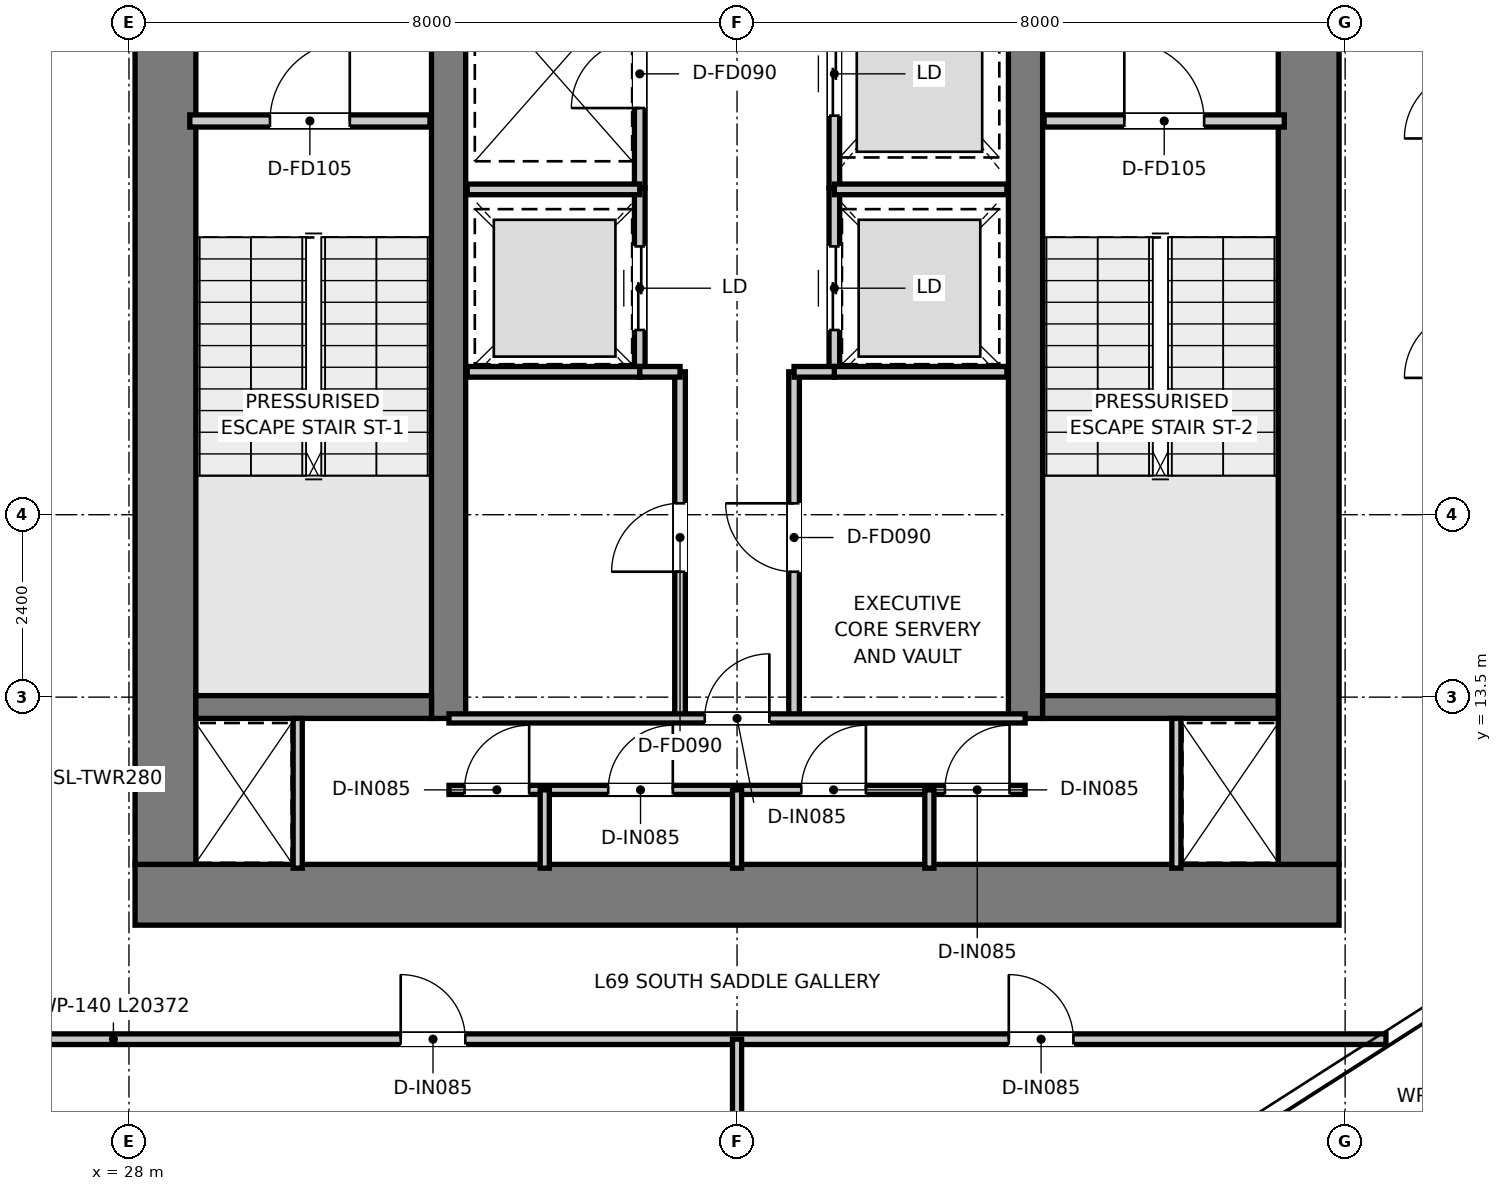
"""IFC4 building model, lengths in metres.
Left out: names, types, materials, properties, quantities, classifications, styles, units other than length and angle.
Written with IfcOpenShell. Run it as: python <this file> out.ifc"""

import sys

from ifc_helpers import new_model, si_unit, direction, frame, frame_2d, origin, place, context, subcontext, project, spatial, rectangle, extrude, element, fill, save


model = new_model("IFC4")
c1 = context("Model", 3, precision=1e-05, world=origin(), true_north=direction((0.0, 1.0)))
c2 = subcontext(c1, "Body", "Model", "MODEL_VIEW")
j1 = project(units=[si_unit("LENGTHUNIT", "METRE"), si_unit("PLANEANGLEUNIT", "RADIAN")], contexts=[c1])
p1 = place(None, origin())
s1 = spatial("IfcSite", under=j1, at=p1, CompositionType="ELEMENT")
p2 = place(p1, origin())
s2 = spatial("IfcBuilding", under=s1, at=p2, CompositionType="ELEMENT")
p3 = place(p2, frame((0.0, 0.0, 283.2)))
s3 = spatial("IfcBuildingStorey", under=s2, at=p3, CompositionType="ELEMENT", Elevation=283.2)
p4 = place(p3, frame((28.08, 10.9, 0.0), z_axis=(0.0, 0.0, 1.0), x_axis=(1.0, 0.0, 0.0)))
e1 = element("IfcWall", 1, at=p4, inside=s3, PredefinedType="SHEAR", context=c2, shape_type="SweptSolid", body=[
    extrude(rectangle(XDim=15.84, YDim=0.8, at=frame_2d((7.92, 0.0))), origin(), (0.0, 0.0, 1.0), 3.95),
])
for number, where, z_axis, x_axis in (
    (2, (28.48, 11.3, 0.0), (0.0, 0.0, 1.0), (0.0, 1.0, 0.0)),
    (3, (43.52, 11.3, 0.0), (0.0, 0.0, 1.0), (0.0, 1.0, 0.0)),
):
    element("IfcWall", number, at=place(p3, frame(where, z_axis=z_axis, x_axis=x_axis)), inside=s3, PredefinedType="SHEAR", context=c2, shape_type="SweptSolid", body=[
        extrude(rectangle(XDim=14.7, YDim=0.8, at=frame_2d((7.35, 0.0))), origin(), (0.0, 0.0, 1.0), 3.95),
    ])
p5 = place(p3, frame((32.205, 13.22, 0.0), z_axis=(0.0, 0.0, 1.0), x_axis=(0.0, 1.0, 0.0)))
e4 = element("IfcWall", 4, at=p5, inside=s3, PredefinedType="SHEAR", context=c2, shape_type="SweptSolid", body=[
    extrude(rectangle(XDim=12.78, YDim=0.45, at=frame_2d((6.39, 0.0))), origin(), (0.0, 0.0, 1.0), 3.95),
])
p6 = place(p5, frame((10.58, 0.0, 0.0)))
e5 = element("IfcOpeningElement", 5, at=p6, cuts=e4, PredefinedType="OPENING", context=c2, shape_type="SweptSolid", body=[
    extrude(rectangle(XDim=1.1, YDim=2.15, at=frame_2d((0.55, 1.075))), frame((0.0, 0.235, 0.0), z_axis=(0.0, -1.0, 0.0), x_axis=(1.0, 0.0, 0.0)), (0.0, 0.0, 1.0), 0.47),
])
p7 = place(p3, frame((39.795, 13.22, 0.0), z_axis=(0.0, 0.0, 1.0), x_axis=(0.0, 1.0, 0.0)))
e6 = element("IfcWall", 6, at=p7, inside=s3, PredefinedType="SHEAR", context=c2, shape_type="SweptSolid", body=[
    extrude(rectangle(XDim=12.78, YDim=0.45, at=frame_2d((6.39, 0.0))), origin(), (0.0, 0.0, 1.0), 3.95),
])
p8 = place(p7, frame((10.58, 0.0, 0.0)))
e7 = element("IfcOpeningElement", 7, at=p8, cuts=e6, PredefinedType="OPENING", context=c2, shape_type="SweptSolid", body=[
    extrude(rectangle(XDim=1.1, YDim=2.15, at=frame_2d((0.55, 1.075))), frame((0.0, 0.235, 0.0), z_axis=(0.0, -1.0, 0.0), x_axis=(1.0, 0.0, 0.0)), (0.0, 0.0, 1.0), 0.47),
])
for number, where, z_axis, x_axis in (
    (8, (28.88, 13.37, 0.0), (0.0, 0.0, 1.0), (1.0, 0.0, 0.0)),
    (9, (40.02, 13.37, 0.0), (0.0, 0.0, 1.0), (1.0, 0.0, 0.0)),
):
    element("IfcWall", number, at=place(p3, frame(where, z_axis=z_axis, x_axis=x_axis)), inside=s3, PredefinedType="SHEAR", context=c2, shape_type="SweptSolid", body=[
        extrude(rectangle(XDim=3.1, YDim=0.3, at=frame_2d((1.55, 0.0))), origin(), (0.0, 0.0, 1.0), 3.95),
    ])
p9 = place(p3, frame((28.8, 21.08, 0.0), z_axis=(0.0, 0.0, 1.0), x_axis=(1.0, 0.0, 0.0)))
e10 = element("IfcWall", 10, at=p9, inside=s3, PredefinedType="PARTITIONING", context=c2, shape_type="SweptSolid", body=[
    extrude(rectangle(XDim=3.16, YDim=0.16, at=frame_2d((1.58, 0.0))), origin(), (0.0, 0.0, 1.0), 3.67),
])
p10 = place(p9, frame((1.055, 0.0, 0.0)))
e11 = element("IfcOpeningElement", 11, at=p10, cuts=e10, PredefinedType="OPENING", context=c2, shape_type="SweptSolid", body=[
    extrude(rectangle(XDim=1.05, YDim=2.1, at=frame_2d((0.525, 1.05))), frame((0.0, 0.09, 0.0), z_axis=(0.0, -1.0, 0.0), x_axis=(1.0, 0.0, 0.0)), (0.0, 0.0, 1.0), 0.18),
])
p11 = place(p3, frame((40.04, 21.08, 0.0), z_axis=(0.0, 0.0, 1.0), x_axis=(1.0, 0.0, 0.0)))
e12 = element("IfcWall", 12, at=p11, inside=s3, PredefinedType="PARTITIONING", context=c2, shape_type="SweptSolid", body=[
    extrude(rectangle(XDim=3.16, YDim=0.16, at=frame_2d((1.58, 0.0))), origin(), (0.0, 0.0, 1.0), 3.67),
])
p12 = place(p11, frame((1.055, 0.0, 0.0)))
e13 = element("IfcOpeningElement", 13, at=p12, cuts=e12, PredefinedType="OPENING", context=c2, shape_type="SweptSolid", body=[
    extrude(rectangle(XDim=1.05, YDim=2.1, at=frame_2d((0.525, 1.05))), frame((0.0, 0.09, 0.0), z_axis=(0.0, -1.0, 0.0), x_axis=(1.0, 0.0, 0.0)), (0.0, 0.0, 1.0), 0.18),
])
p13 = place(p3, frame((34.72, 20.2, 0.0), z_axis=(0.0, 0.0, 1.0), x_axis=(0.0, 1.0, 0.0)))
e14 = element("IfcWall", 14, at=p13, inside=s3, PredefinedType="PARTITIONING", context=c2, shape_type="SweptSolid", body=[
    extrude(rectangle(XDim=5.78, YDim=0.14, at=frame_2d((2.89, 0.0))), origin(), (0.0, 0.0, 1.0), 2.82),
])
p14 = place(p13, frame((1.05, 0.0, 0.0)))
e15 = element("IfcOpeningElement", 15, at=p14, cuts=e14, PredefinedType="OPENING", context=c2, shape_type="SweptSolid", body=[
    extrude(rectangle(XDim=0.9, YDim=2.1, at=frame_2d((0.45, 1.05))), frame((0.0, 0.08, 0.0), z_axis=(0.0, -1.0, 0.0), x_axis=(1.0, 0.0, 0.0)), (0.0, 0.0, 1.0), 0.16),
])
p15 = place(p3, frame((37.28, 20.2, 0.0), z_axis=(0.0, 0.0, 1.0), x_axis=(0.0, 1.0, 0.0)))
e16 = element("IfcWall", 16, at=p15, inside=s3, PredefinedType="PARTITIONING", context=c2, shape_type="SweptSolid", body=[
    extrude(rectangle(XDim=5.78, YDim=0.14, at=frame_2d((2.89, 0.0))), origin(), (0.0, 0.0, 1.0), 2.82),
])
p16 = place(p15, frame((0.95, 0.0, 0.0)))
e17 = element("IfcOpeningElement", 17, at=p16, cuts=e16, PredefinedType="OPENING", context=c2, shape_type="SweptSolid", body=[
    extrude(rectangle(XDim=1.1, YDim=2.15, at=frame_2d((0.55, 1.075))), frame((0.0, 0.08, 0.0), z_axis=(0.0, -1.0, 0.0), x_axis=(1.0, 0.0, 0.0)), (0.0, 0.0, 1.0), 0.16),
])
p17 = place(p3, frame((34.72, 17.78, 0.0), z_axis=(0.0, 0.0, 1.0), x_axis=(0.0, 1.0, 0.0)))
e18 = element("IfcWall", 18, at=p17, inside=s3, PredefinedType="PARTITIONING", context=c2, shape_type="SweptSolid", body=[
    extrude(rectangle(XDim=2.42, YDim=0.14, at=frame_2d((1.21, 0.0))), origin(), (0.0, 0.0, 1.0), 3.67),
])
p18 = place(p17, frame((0.55, 0.0, 0.0)))
e19 = element("IfcOpeningElement", 19, at=p18, cuts=e18, PredefinedType="OPENING", context=c2, shape_type="SweptSolid", body=[
    extrude(rectangle(XDim=1.1, YDim=2.15, at=frame_2d((0.55, 1.075))), frame((0.0, 0.08, 0.0), z_axis=(0.0, -1.0, 0.0), x_axis=(1.0, 0.0, 0.0)), (0.0, 0.0, 1.0), 0.16),
])
p19 = place(p3, frame((37.28, 17.78, 0.0), z_axis=(0.0, 0.0, 1.0), x_axis=(0.0, 1.0, 0.0)))
e20 = element("IfcWall", 20, at=p19, inside=s3, PredefinedType="PARTITIONING", context=c2, shape_type="SweptSolid", body=[
    extrude(rectangle(XDim=2.42, YDim=0.14, at=frame_2d((1.21, 0.0))), origin(), (0.0, 0.0, 1.0), 3.67),
])
p20 = place(p19, frame((0.55, 0.0, 0.0)))
e21 = element("IfcOpeningElement", 21, at=p20, cuts=e20, PredefinedType="OPENING", context=c2, shape_type="SweptSolid", body=[
    extrude(rectangle(XDim=1.1, YDim=2.15, at=frame_2d((0.55, 1.075))), frame((0.0, 0.08, 0.0), z_axis=(0.0, -1.0, 0.0), x_axis=(1.0, 0.0, 0.0)), (0.0, 0.0, 1.0), 0.16),
])
for number, where, z_axis, x_axis in (
    (22, (32.45, 17.78, 0.0), (0.0, 0.0, 1.0), (1.0, 0.0, 0.0)),
    (23, (32.45, 20.18, 0.0), (0.0, 0.0, 1.0), (1.0, 0.0, 0.0)),
    (24, (37.28, 17.78, 0.0), (0.0, 0.0, 1.0), (1.0, 0.0, 0.0)),
    (25, (37.28, 20.18, 0.0), (0.0, 0.0, 1.0), (1.0, 0.0, 0.0)),
):
    element("IfcWall", number, at=place(p3, frame(where, z_axis=z_axis, x_axis=x_axis)), inside=s3, PredefinedType="PARTITIONING", context=c2, shape_type="SweptSolid", body=[
        extrude(rectangle(XDim=2.27, YDim=0.14, at=frame_2d((1.135, 0.0))), origin(), (0.0, 0.0, 1.0), 3.67),
    ])
p21 = place(p3, frame((35.25, 13.22, 0.0), z_axis=(0.0, 0.0, 1.0), x_axis=(0.0, 1.0, 0.0)))
e26 = element("IfcWall", 26, at=p21, inside=s3, PredefinedType="PARTITIONING", context=c2, shape_type="SweptSolid", body=[
    extrude(rectangle(XDim=4.56, YDim=0.14, at=frame_2d((2.28, 0.0))), origin(), (0.0, 0.0, 1.0), 3.67),
])
p22 = place(p21, frame((1.93, 0.0, 0.0)))
e27 = element("IfcOpeningElement", 27, at=p22, cuts=e26, PredefinedType="OPENING", context=c2, shape_type="SweptSolid", body=[
    extrude(rectangle(XDim=0.9, YDim=2.1, at=frame_2d((0.45, 1.05))), frame((0.0, 0.08, 0.0), z_axis=(0.0, -1.0, 0.0), x_axis=(1.0, 0.0, 0.0)), (0.0, 0.0, 1.0), 0.16),
])
p23 = place(p3, frame((34.72, 17.78, 0.0), z_axis=(0.0, 0.0, 1.0), x_axis=(1.0, 0.0, 0.0)))
e28 = element("IfcWall", 28, at=p23, inside=s3, PredefinedType="PARTITIONING", context=c2, shape_type="SweptSolid", body=[
    extrude(rectangle(XDim=0.53, YDim=0.14, at=frame_2d((0.265, 0.0))), origin(), (0.0, 0.0, 1.0), 3.67),
])
p24 = place(p3, frame((36.75, 13.22, 0.0), z_axis=(0.0, 0.0, 1.0), x_axis=(0.0, 1.0, 0.0)))
e29 = element("IfcWall", 29, at=p24, inside=s3, PredefinedType="PARTITIONING", context=c2, shape_type="SweptSolid", body=[
    extrude(rectangle(XDim=4.56, YDim=0.14, at=frame_2d((2.28, 0.0))), origin(), (0.0, 0.0, 1.0), 3.67),
])
p25 = place(p24, frame((1.93, 0.0, 0.0)))
e30 = element("IfcOpeningElement", 30, at=p25, cuts=e29, PredefinedType="OPENING", context=c2, shape_type="SweptSolid", body=[
    extrude(rectangle(XDim=0.9, YDim=2.1, at=frame_2d((0.45, 1.05))), frame((0.0, 0.08, 0.0), z_axis=(0.0, -1.0, 0.0), x_axis=(1.0, 0.0, 0.0)), (0.0, 0.0, 1.0), 0.16),
])
p26 = place(p3, frame((36.75, 17.78, 0.0), z_axis=(0.0, 0.0, 1.0), x_axis=(1.0, 0.0, 0.0)))
e31 = element("IfcWall", 31, at=p26, inside=s3, PredefinedType="PARTITIONING", context=c2, shape_type="SweptSolid", body=[
    extrude(rectangle(XDim=0.53, YDim=0.14, at=frame_2d((0.265, 0.0))), origin(), (0.0, 0.0, 1.0), 3.67),
])
for number, where, z_axis, x_axis in (
    (32, (30.22, 11.25, 0.0), (0.0, 0.0, 1.0), (0.0, 1.0, 0.0)),
    (33, (41.78, 11.25, 0.0), (0.0, 0.0, 1.0), (0.0, 1.0, 0.0)),
):
    element("IfcWall", number, at=place(p3, frame(where, z_axis=z_axis, x_axis=x_axis)), inside=s3, PredefinedType="PARTITIONING", context=c2, shape_type="SweptSolid", body=[
        extrude(rectangle(XDim=1.97, YDim=0.12, at=frame_2d((0.985, 0.0))), origin(), (0.0, 0.0, 1.0), 3.67),
    ])
p27 = place(p3, frame((32.21, 13.22, 0.0), z_axis=(0.0, 0.0, 1.0), x_axis=(1.0, 0.0, 0.0)))
e34 = element("IfcWall", 34, at=p27, inside=s3, PredefinedType="PARTITIONING", context=c2, shape_type="SweptSolid", body=[
    extrude(rectangle(XDim=7.58, YDim=0.12, at=frame_2d((3.79, 0.0))), origin(), (0.0, 0.0, 1.0), 3.67),
])
p28 = place(p27, frame((3.365, 0.0, 0.0)))
e35 = element("IfcOpeningElement", 35, at=p28, cuts=e34, PredefinedType="OPENING", context=c2, shape_type="SweptSolid", body=[
    extrude(rectangle(XDim=0.85, YDim=2.1, at=frame_2d((0.425, 1.05))), frame((0.0, 0.07, 0.0), z_axis=(0.0, -1.0, 0.0), x_axis=(1.0, 0.0, 0.0)), (0.0, 0.0, 1.0), 0.14),
])
p29 = place(p3, frame((32.21, 12.28, 0.0), z_axis=(0.0, 0.0, 1.0), x_axis=(1.0, 0.0, 0.0)))
e36 = element("IfcWall", 36, at=p29, inside=s3, PredefinedType="PARTITIONING", context=c2, shape_type="SweptSolid", body=[
    extrude(rectangle(XDim=7.58, YDim=0.12, at=frame_2d((3.79, 0.0))), origin(), (0.0, 0.0, 1.0), 3.67),
])
p30 = place(p29, frame((0.205, 0.0, 0.0)))
e37 = element("IfcOpeningElement", 37, at=p30, cuts=e36, PredefinedType="OPENING", context=c2, shape_type="SweptSolid", body=[
    extrude(rectangle(XDim=0.85, YDim=2.1, at=frame_2d((0.425, 1.05))), frame((0.0, 0.07, 0.0), z_axis=(0.0, -1.0, 0.0), x_axis=(1.0, 0.0, 0.0)), (0.0, 0.0, 1.0), 0.14),
])
p31 = place(p29, frame((2.095, 0.0, 0.0)))
e38 = element("IfcOpeningElement", 38, at=p31, cuts=e36, PredefinedType="OPENING", context=c2, shape_type="SweptSolid", body=[
    extrude(rectangle(XDim=0.85, YDim=2.1, at=frame_2d((0.425, 1.05))), frame((0.0, 0.07, 0.0), z_axis=(0.0, -1.0, 0.0), x_axis=(1.0, 0.0, 0.0)), (0.0, 0.0, 1.0), 0.14),
])
p32 = place(p29, frame((4.635, 0.0, 0.0)))
e39 = element("IfcOpeningElement", 39, at=p32, cuts=e36, PredefinedType="OPENING", context=c2, shape_type="SweptSolid", body=[
    extrude(rectangle(XDim=0.85, YDim=2.1, at=frame_2d((0.425, 1.05))), frame((0.0, 0.07, 0.0), z_axis=(0.0, -1.0, 0.0), x_axis=(1.0, 0.0, 0.0)), (0.0, 0.0, 1.0), 0.14),
])
p33 = place(p29, frame((6.525, 0.0, 0.0)))
e40 = element("IfcOpeningElement", 40, at=p33, cuts=e36, PredefinedType="OPENING", context=c2, shape_type="SweptSolid", body=[
    extrude(rectangle(XDim=0.85, YDim=2.1, at=frame_2d((0.425, 1.05))), frame((0.0, 0.07, 0.0), z_axis=(0.0, -1.0, 0.0), x_axis=(1.0, 0.0, 0.0)), (0.0, 0.0, 1.0), 0.14),
])
for number, where, z_axis, x_axis in (
    (41, (33.47, 11.25, 0.0), (0.0, 0.0, 1.0), (0.0, 1.0, 0.0)),
    (42, (36.0, 11.25, 0.0), (0.0, 0.0, 1.0), (0.0, 1.0, 0.0)),
    (43, (38.53, 11.25, 0.0), (0.0, 0.0, 1.0), (0.0, 1.0, 0.0)),
):
    element("IfcWall", number, at=place(p3, frame(where, z_axis=z_axis, x_axis=x_axis)), inside=s3, PredefinedType="PARTITIONING", context=c2, shape_type="SweptSolid", body=[
        extrude(rectangle(XDim=1.03, YDim=0.12, at=frame_2d((0.515, 0.0))), origin(), (0.0, 0.0, 1.0), 3.67),
    ])
p34 = place(p3, frame((24.166, 9.0, 0.0), z_axis=(0.0, 0.0, 1.0), x_axis=(1.0, 0.0, 0.0)))
e44 = element("IfcWall", 44, at=p34, inside=s3, PredefinedType="PARTITIONING", context=c2, shape_type="SweptSolid", body=[
    extrude(rectangle(XDim=20.372, YDim=0.14, at=frame_2d((10.186, 0.0))), origin(), (0.0, 0.0, 1.0), 3.67),
])
p35 = place(p34, frame((7.409, 0.0, 0.0)))
e45 = element("IfcOpeningElement", 45, at=p35, cuts=e44, PredefinedType="OPENING", context=c2, shape_type="SweptSolid", body=[
    extrude(rectangle(XDim=0.85, YDim=2.1, at=frame_2d((0.425, 1.05))), frame((0.0, 0.08, 0.0), z_axis=(0.0, -1.0, 0.0), x_axis=(1.0, 0.0, 0.0)), (0.0, 0.0, 1.0), 0.16),
])
p36 = place(p34, frame((15.409, 0.0, 0.0)))
e46 = element("IfcOpeningElement", 46, at=p36, cuts=e44, PredefinedType="OPENING", context=c2, shape_type="SweptSolid", body=[
    extrude(rectangle(XDim=0.85, YDim=2.1, at=frame_2d((0.425, 1.05))), frame((0.0, 0.08, 0.0), z_axis=(0.0, -1.0, 0.0), x_axis=(1.0, 0.0, 0.0)), (0.0, 0.0, 1.0), 0.16),
])
p37 = place(p3, frame((36.0, 3.535, 0.0), z_axis=(0.0, 0.0, 1.0), x_axis=(0.0, 1.0, 0.0)))
e47 = element("IfcWall", 47, at=p37, inside=s3, PredefinedType="PARTITIONING", context=c2, shape_type="SweptSolid", body=[
    extrude(rectangle(XDim=5.465, YDim=0.12, at=frame_2d((2.732, 0.0))), origin(), (0.0, 0.0, 1.0), 3.67),
])
p38 = place(p10, origin())
e48 = element("IfcDoor", 48, at=p38, inside=s3, OperationType="SINGLE_SWING_RIGHT", PredefinedType="DOOR", context=c2, shape_type="SweptSolid", body=[
    extrude(rectangle(XDim=1.05, YDim=2.1, at=frame_2d((0.525, 1.05))), frame((0.0, 0.025, 0.0), z_axis=(0.0, -1.0, 0.0), x_axis=(1.0, 0.0, 0.0)), (0.0, 0.0, 1.0), 0.05),
])
fill(e11, e48)
p39 = place(p12, origin())
e49 = element("IfcDoor", 49, at=p39, inside=s3, OperationType="SINGLE_SWING_LEFT", PredefinedType="DOOR", context=c2, shape_type="SweptSolid", body=[
    extrude(rectangle(XDim=1.05, YDim=2.1, at=frame_2d((0.525, 1.05))), frame((0.0, 0.025, 0.0), z_axis=(0.0, -1.0, 0.0), x_axis=(1.0, 0.0, 0.0)), (0.0, 0.0, 1.0), 0.05),
])
fill(e13, e49)
p40 = place(p14, origin())
e50 = element("IfcDoor", 50, at=p40, inside=s3, OperationType="SINGLE_SWING_LEFT", PredefinedType="DOOR", context=c2, shape_type="SweptSolid", body=[
    extrude(rectangle(XDim=0.9, YDim=2.1, at=frame_2d((0.45, 1.05))), frame((0.0, 0.025, 0.0), z_axis=(0.0, -1.0, 0.0), x_axis=(1.0, 0.0, 0.0)), (0.0, 0.0, 1.0), 0.05),
])
fill(e15, e50)
p41 = place(p16, origin())
e51 = element("IfcDoor", 51, at=p41, inside=s3, OperationType="DOUBLE_DOOR_SLIDING", PredefinedType="DOOR", context=c2, shape_type="SweptSolid", body=[
    extrude(rectangle(XDim=1.1, YDim=2.15, at=frame_2d((0.55, 1.075))), frame((0.0, 0.025, 0.0), z_axis=(0.0, -1.0, 0.0), x_axis=(1.0, 0.0, 0.0)), (0.0, 0.0, 1.0), 0.05),
])
fill(e17, e51)
p42 = place(p18, origin())
e52 = element("IfcDoor", 52, at=p42, inside=s3, OperationType="DOUBLE_DOOR_SLIDING", PredefinedType="DOOR", context=c2, shape_type="SweptSolid", body=[
    extrude(rectangle(XDim=1.1, YDim=2.15, at=frame_2d((0.55, 1.075))), frame((0.0, 0.025, 0.0), z_axis=(0.0, -1.0, 0.0), x_axis=(1.0, 0.0, 0.0)), (0.0, 0.0, 1.0), 0.05),
])
fill(e19, e52)
p43 = place(p20, origin())
e53 = element("IfcDoor", 53, at=p43, inside=s3, OperationType="DOUBLE_DOOR_SLIDING", PredefinedType="DOOR", context=c2, shape_type="SweptSolid", body=[
    extrude(rectangle(XDim=1.1, YDim=2.15, at=frame_2d((0.55, 1.075))), frame((0.0, 0.025, 0.0), z_axis=(0.0, -1.0, 0.0), x_axis=(1.0, 0.0, 0.0)), (0.0, 0.0, 1.0), 0.05),
])
fill(e21, e53)
p44 = place(p22, origin())
e54 = element("IfcDoor", 54, at=p44, inside=s3, OperationType="SINGLE_SWING_LEFT", PredefinedType="DOOR", context=c2, shape_type="SweptSolid", body=[
    extrude(rectangle(XDim=0.9, YDim=2.1, at=frame_2d((0.45, 1.05))), frame((0.0, 0.025, 0.0), z_axis=(0.0, -1.0, 0.0), x_axis=(1.0, 0.0, 0.0)), (0.0, 0.0, 1.0), 0.05),
])
fill(e27, e54)
p45 = place(p25, origin())
e55 = element("IfcDoor", 55, at=p45, inside=s3, OperationType="SINGLE_SWING_RIGHT", PredefinedType="DOOR", context=c2, shape_type="SweptSolid", body=[
    extrude(rectangle(XDim=0.9, YDim=2.1, at=frame_2d((0.45, 1.05))), frame((0.0, 0.025, 0.0), z_axis=(0.0, -1.0, 0.0), x_axis=(1.0, 0.0, 0.0)), (0.0, 0.0, 1.0), 0.05),
])
fill(e30, e55)
p46 = place(p28, origin())
e56 = element("IfcDoor", 56, at=p46, inside=s3, OperationType="SINGLE_SWING_RIGHT", PredefinedType="DOOR", context=c2, shape_type="SweptSolid", body=[
    extrude(rectangle(XDim=0.85, YDim=2.1, at=frame_2d((0.425, 1.05))), frame((0.0, 0.025, 0.0), z_axis=(0.0, -1.0, 0.0), x_axis=(1.0, 0.0, 0.0)), (0.0, 0.0, 1.0), 0.05),
])
fill(e35, e56)
p47 = place(p30, origin())
e57 = element("IfcDoor", 57, at=p47, inside=s3, OperationType="SINGLE_SWING_RIGHT", PredefinedType="DOOR", context=c2, shape_type="SweptSolid", body=[
    extrude(rectangle(XDim=0.85, YDim=2.1, at=frame_2d((0.425, 1.05))), frame((0.0, 0.025, 0.0), z_axis=(0.0, -1.0, 0.0), x_axis=(1.0, 0.0, 0.0)), (0.0, 0.0, 1.0), 0.05),
])
fill(e37, e57)
p48 = place(p31, origin())
e58 = element("IfcDoor", 58, at=p48, inside=s3, OperationType="SINGLE_SWING_RIGHT", PredefinedType="DOOR", context=c2, shape_type="SweptSolid", body=[
    extrude(rectangle(XDim=0.85, YDim=2.1, at=frame_2d((0.425, 1.05))), frame((0.0, 0.025, 0.0), z_axis=(0.0, -1.0, 0.0), x_axis=(1.0, 0.0, 0.0)), (0.0, 0.0, 1.0), 0.05),
])
fill(e38, e58)
p49 = place(p32, origin())
e59 = element("IfcDoor", 59, at=p49, inside=s3, OperationType="SINGLE_SWING_RIGHT", PredefinedType="DOOR", context=c2, shape_type="SweptSolid", body=[
    extrude(rectangle(XDim=0.85, YDim=2.1, at=frame_2d((0.425, 1.05))), frame((0.0, 0.025, 0.0), z_axis=(0.0, -1.0, 0.0), x_axis=(1.0, 0.0, 0.0)), (0.0, 0.0, 1.0), 0.05),
])
fill(e39, e59)
p50 = place(p33, origin())
e60 = element("IfcDoor", 60, at=p50, inside=s3, OperationType="SINGLE_SWING_RIGHT", PredefinedType="DOOR", context=c2, shape_type="SweptSolid", body=[
    extrude(rectangle(XDim=0.85, YDim=2.1, at=frame_2d((0.425, 1.05))), frame((0.0, 0.025, 0.0), z_axis=(0.0, -1.0, 0.0), x_axis=(1.0, 0.0, 0.0)), (0.0, 0.0, 1.0), 0.05),
])
fill(e40, e60)
p51 = place(p35, origin())
e61 = element("IfcDoor", 61, at=p51, inside=s3, OperationType="SINGLE_SWING_LEFT", PredefinedType="DOOR", context=c2, shape_type="SweptSolid", body=[
    extrude(rectangle(XDim=0.85, YDim=2.1, at=frame_2d((0.425, 1.05))), frame((0.0, 0.025, 0.0), z_axis=(0.0, -1.0, 0.0), x_axis=(1.0, 0.0, 0.0)), (0.0, 0.0, 1.0), 0.05),
])
fill(e45, e61)
p52 = place(p36, origin())
e62 = element("IfcDoor", 62, at=p52, inside=s3, OperationType="SINGLE_SWING_LEFT", PredefinedType="DOOR", context=c2, shape_type="SweptSolid", body=[
    extrude(rectangle(XDim=0.85, YDim=2.1, at=frame_2d((0.425, 1.05))), frame((0.0, 0.025, 0.0), z_axis=(0.0, -1.0, 0.0), x_axis=(1.0, 0.0, 0.0)), (0.0, 0.0, 1.0), 0.05),
])
fill(e46, e62)
save(model, sys.argv[1])
